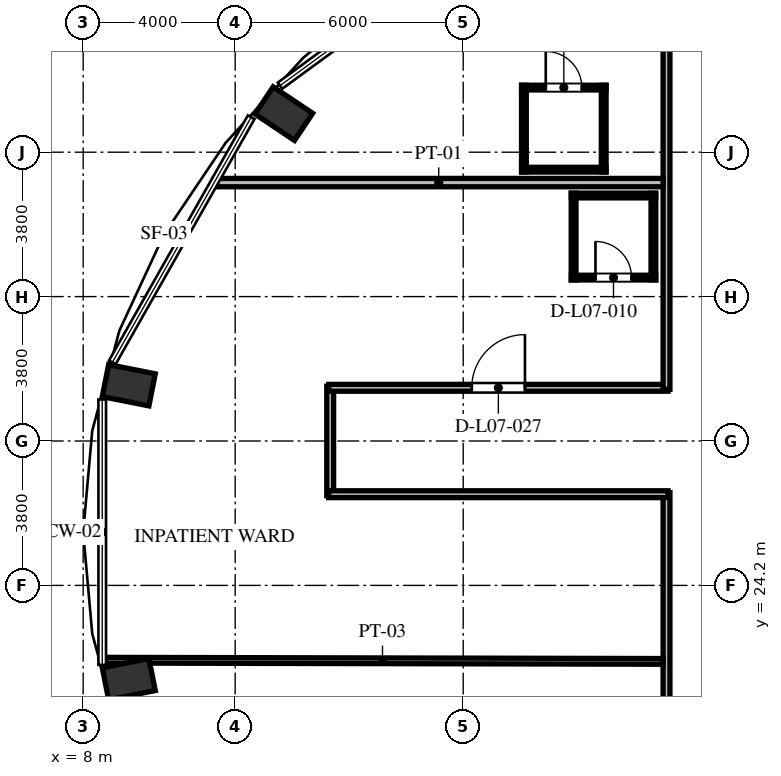
"""IFC4 building model, lengths in metres.
Left out: names, types, materials, properties, quantities, classifications, styles, units other than length and angle.
Written with IfcOpenShell. Run it as: python <this file> out.ifc"""

import sys

from ifc_helpers import new_model, si_unit, direction, frame, frame_2d, origin, origin_2d, place, context, subcontext, project, spatial, rectangle, extrude, element, fill, save


model = new_model("IFC4")
c1 = context("Model", 3, precision=1e-05, world=origin(), true_north=direction((0.0, 1.0)))
c2 = subcontext(c1, "Body", "Model", "MODEL_VIEW")
j1 = project(units=[si_unit("LENGTHUNIT", "METRE"), si_unit("PLANEANGLEUNIT", "RADIAN")], contexts=[c1])
p1 = place(None, origin())
s1 = spatial("IfcSite", under=j1, at=p1, CompositionType="ELEMENT")
p2 = place(p1, origin())
s2 = spatial("IfcBuilding", under=s1, at=p2, CompositionType="ELEMENT")
p3 = place(p2, frame((0.0, 0.0, 32.496)))
s3 = spatial("IfcBuildingStorey", under=s2, at=p3, CompositionType="ELEMENT", Elevation=32.496)
for number, where, z_axis, x_axis in (
    (1, (13.28, 36.614, 0.0), (0.0, 0.0, 1.0), (-0.831, 0.556, 0.0)),
    (2, (9.2, 29.468, 0.0), (0.0, 0.0, 1.0), (-0.981, 0.195, 0.0)),
    (3, (9.2, 21.732, 0.0), (0.0, 0.0, 1.0), (-0.981, -0.195, 0.0)),
):
    element("IfcColumn", number, at=place(p3, frame(where, z_axis=z_axis, x_axis=x_axis)), inside=s3, PredefinedType="COLUMN", context=c2, shape_type="SweptSolid", body=[
        extrude(rectangle(XDim=1.25, YDim=0.86, at=origin_2d()), origin(), (0.0, 0.0, 1.0), 3.648),
    ])
p4 = place(p3, frame((14.5, 26.56, 0.0), z_axis=(0.0, 0.0, 1.0), x_axis=(0.0, 1.0, 0.0)))
e4 = element("IfcWall", 4, at=p4, inside=s3, PredefinedType="PARTITIONING", context=c2, shape_type="SweptSolid", body=[
    extrude(rectangle(XDim=2.88, YDim=0.18, at=frame_2d((1.44, 0.0))), origin(), (0.0, 0.0, 1.0), 3.428),
])
p5 = place(p3, frame((14.46, 29.4, 0.0), z_axis=(0.0, 0.0, 1.0), x_axis=(1.0, 0.0, 0.0)))
e5 = element("IfcWall", 5, at=p5, inside=s3, PredefinedType="PARTITIONING", context=c2, shape_type="SweptSolid", body=[
    extrude(rectangle(XDim=8.93, YDim=0.18, at=frame_2d((4.465, 0.0))), origin(), (0.0, 0.0, 1.0), 3.428),
])
p6 = place(p5, frame((3.765, 0.0, 0.0)))
e6 = element("IfcOpeningElement", 6, at=p6, cuts=e5, PredefinedType="OPENING", context=c2, shape_type="SweptSolid", body=[
    extrude(rectangle(XDim=1.4, YDim=2.2, at=frame_2d((0.7, 1.1))), frame((0.0, 0.1, 0.0), z_axis=(0.0, -1.0, 0.0), x_axis=(1.0, 0.0, 0.0)), (0.0, 0.0, 1.0), 0.2),
])
p7 = place(p3, frame((23.35, 29.36, 0.0), z_axis=(0.0, 0.0, 1.0), x_axis=(0.0, 1.0, 0.0)))
e7 = element("IfcWall", 7, at=p7, inside=s3, PredefinedType="PARTITIONING", context=c2, shape_type="SweptSolid", body=[
    extrude(rectangle(XDim=9.43, YDim=0.18, at=frame_2d((4.715, 0.0))), origin(), (0.0, 0.0, 1.0), 3.428),
])
p8 = place(p3, frame((23.35, 17.36, 0.0), z_axis=(0.0, 0.0, 1.0), x_axis=(0.0, 1.0, 0.0)))
e8 = element("IfcWall", 8, at=p8, inside=s3, PredefinedType="PARTITIONING", context=c2, shape_type="SweptSolid", body=[
    extrude(rectangle(XDim=9.28, YDim=0.18, at=frame_2d((4.64, 0.0))), origin(), (0.0, 0.0, 1.0), 3.428),
])
p9 = place(p3, frame((23.39, 26.6, 0.0), z_axis=(0.0, 0.0, 1.0), x_axis=(-1.0, 0.0, 0.0)))
e9 = element("IfcWall", 9, at=p9, inside=s3, PredefinedType="PARTITIONING", context=c2, shape_type="SweptSolid", body=[
    extrude(rectangle(XDim=8.93, YDim=0.18, at=frame_2d((4.465, 0.0))), origin(), (0.0, 0.0, 1.0), 3.428),
])
p10 = place(p3, frame((8.493, 22.231, 0.0), z_axis=(0.0, 0.0, 1.0), x_axis=(0.999997760873, -0.002116187438, 0.0)))
e10 = element("IfcWall", 10, at=p10, inside=s3, PredefinedType="PARTITIONING", context=c2, shape_type="SweptSolid", body=[
    extrude(rectangle(XDim=14.767, YDim=0.15, at=frame_2d((7.384, 0.0))), origin(), (0.0, 0.0, 1.0), 3.428),
])
p11 = place(p3, frame((11.451, 34.8, 0.0), z_axis=(0.0, 0.0, 1.0), x_axis=(1.0, 0.0, 0.0)))
e11 = element("IfcWall", 11, at=p11, inside=s3, PredefinedType="PARTITIONING", context=c2, shape_type="SweptSolid", body=[
    extrude(rectangle(XDim=11.809, YDim=0.22, at=frame_2d((5.905, 0.0))), origin(), (0.0, 0.0, 1.0), 3.428),
])
p12 = place(p3, frame((19.538, 37.3, 0.0), z_axis=(0.0, 0.0, 1.0), x_axis=(1.0, 0.0, 0.0)))
e12 = element("IfcWall", 12, at=p12, inside=s3, PredefinedType="PARTITIONING", context=c2, shape_type="SweptSolid", body=[
    extrude(rectangle(XDim=2.22, YDim=0.125, at=frame_2d((1.11, 0.0))), origin(), (0.0, 0.0, 1.0), 3.428),
])
p13 = place(p12, frame((0.635, 0.0, 0.0)))
e13 = element("IfcOpeningElement", 13, at=p13, cuts=e12, PredefinedType="OPENING", context=c2, shape_type="SweptSolid", body=[
    extrude(rectangle(XDim=0.95, YDim=2.1, at=frame_2d((0.475, 1.05))), frame((0.0, 0.073, 0.0), z_axis=(0.0, -1.0, 0.0), x_axis=(1.0, 0.0, 0.0)), (0.0, 0.0, 1.0), 0.145),
])
p14 = place(p3, frame((19.538, 35.14, 0.0), z_axis=(0.0, 0.0, 1.0), x_axis=(1.0, 0.0, 0.0)))
e14 = element("IfcWall", 14, at=p14, inside=s3, PredefinedType="PARTITIONING", context=c2, shape_type="SweptSolid", body=[
    extrude(rectangle(XDim=2.22, YDim=0.125, at=frame_2d((1.11, 0.0))), origin(), (0.0, 0.0, 1.0), 3.428),
])
for number, where, z_axis, x_axis in (
    (15, (21.698, 35.08, 0.0), (0.0, 0.0, 1.0), (0.0, 1.0, 0.0)),
    (16, (19.597, 35.08, 0.0), (0.0, 0.0, 1.0), (0.0, 1.0, 0.0)),
):
    element("IfcWall", number, at=place(p3, frame(where, z_axis=z_axis, x_axis=x_axis)), inside=s3, PredefinedType="PARTITIONING", context=c2, shape_type="SweptSolid", body=[
        extrude(rectangle(XDim=2.28, YDim=0.125, at=frame_2d((1.14, 0.0))), origin(), (0.0, 0.0, 1.0), 3.428),
    ])
p15 = place(p3, frame((20.845, 34.46, 0.0), z_axis=(0.0, 0.0, 1.0), x_axis=(1.0, 0.0, 0.0)))
e17 = element("IfcWall", 17, at=p15, inside=s3, PredefinedType="PARTITIONING", context=c2, shape_type="SweptSolid", body=[
    extrude(rectangle(XDim=2.22, YDim=0.125, at=frame_2d((1.11, 0.0))), origin(), (0.0, 0.0, 1.0), 3.428),
])
p16 = place(p3, frame((20.845, 32.3, 0.0), z_axis=(0.0, 0.0, 1.0), x_axis=(1.0, 0.0, 0.0)))
e18 = element("IfcWall", 18, at=p16, inside=s3, PredefinedType="PARTITIONING", context=c2, shape_type="SweptSolid", body=[
    extrude(rectangle(XDim=2.22, YDim=0.125, at=frame_2d((1.11, 0.0))), origin(), (0.0, 0.0, 1.0), 3.428),
])
p17 = place(p16, frame((0.635, 0.0, 0.0)))
e19 = element("IfcOpeningElement", 19, at=p17, cuts=e18, PredefinedType="OPENING", context=c2, shape_type="SweptSolid", body=[
    extrude(rectangle(XDim=0.95, YDim=2.1, at=frame_2d((0.475, 1.05))), frame((0.0, 0.073, 0.0), z_axis=(0.0, -1.0, 0.0), x_axis=(1.0, 0.0, 0.0)), (0.0, 0.0, 1.0), 0.145),
])
for number, where, z_axis, x_axis in (
    (20, (23.005, 32.24, 0.0), (0.0, 0.0, 1.0), (0.0, 1.0, 0.0)),
    (21, (20.905, 32.24, 0.0), (0.0, 0.0, 1.0), (0.0, 1.0, 0.0)),
):
    element("IfcWall", number, at=place(p3, frame(where, z_axis=z_axis, x_axis=x_axis)), inside=s3, PredefinedType="PARTITIONING", context=c2, shape_type="SweptSolid", body=[
        extrude(rectangle(XDim=2.28, YDim=0.125, at=frame_2d((1.14, 0.0))), origin(), (0.0, 0.0, 1.0), 3.428),
    ])
p18 = place(p13, origin())
e22 = element("IfcDoor", 22, at=p18, inside=s3, OperationType="SINGLE_SWING_LEFT", PredefinedType="DOOR", context=c2, shape_type="SweptSolid", body=[
    extrude(rectangle(XDim=0.95, YDim=2.1, at=frame_2d((0.475, 1.05))), frame((0.0, 0.025, 0.0), z_axis=(0.0, -1.0, 0.0), x_axis=(1.0, 0.0, 0.0)), (0.0, 0.0, 1.0), 0.05),
])
fill(e13, e22)
p19 = place(p17, origin())
e23 = element("IfcDoor", 23, at=p19, inside=s3, OperationType="SINGLE_SWING_LEFT", PredefinedType="DOOR", context=c2, shape_type="SweptSolid", body=[
    extrude(rectangle(XDim=0.95, YDim=2.1, at=frame_2d((0.475, 1.05))), frame((0.0, 0.025, 0.0), z_axis=(0.0, -1.0, 0.0), x_axis=(1.0, 0.0, 0.0)), (0.0, 0.0, 1.0), 0.05),
])
fill(e19, e23)
p20 = place(p6, origin())
e24 = element("IfcDoor", 24, at=p20, inside=s3, OperationType="SINGLE_SWING_RIGHT", PredefinedType="DOOR", context=c2, shape_type="SweptSolid", body=[
    extrude(rectangle(XDim=1.4, YDim=2.2, at=frame_2d((0.7, 1.1))), frame((0.0, 0.025, 0.0), z_axis=(0.0, -1.0, 0.0), x_axis=(1.0, 0.0, 0.0)), (0.0, 0.0, 1.0), 0.05),
])
fill(e6, e24)
save(model, sys.argv[1])
